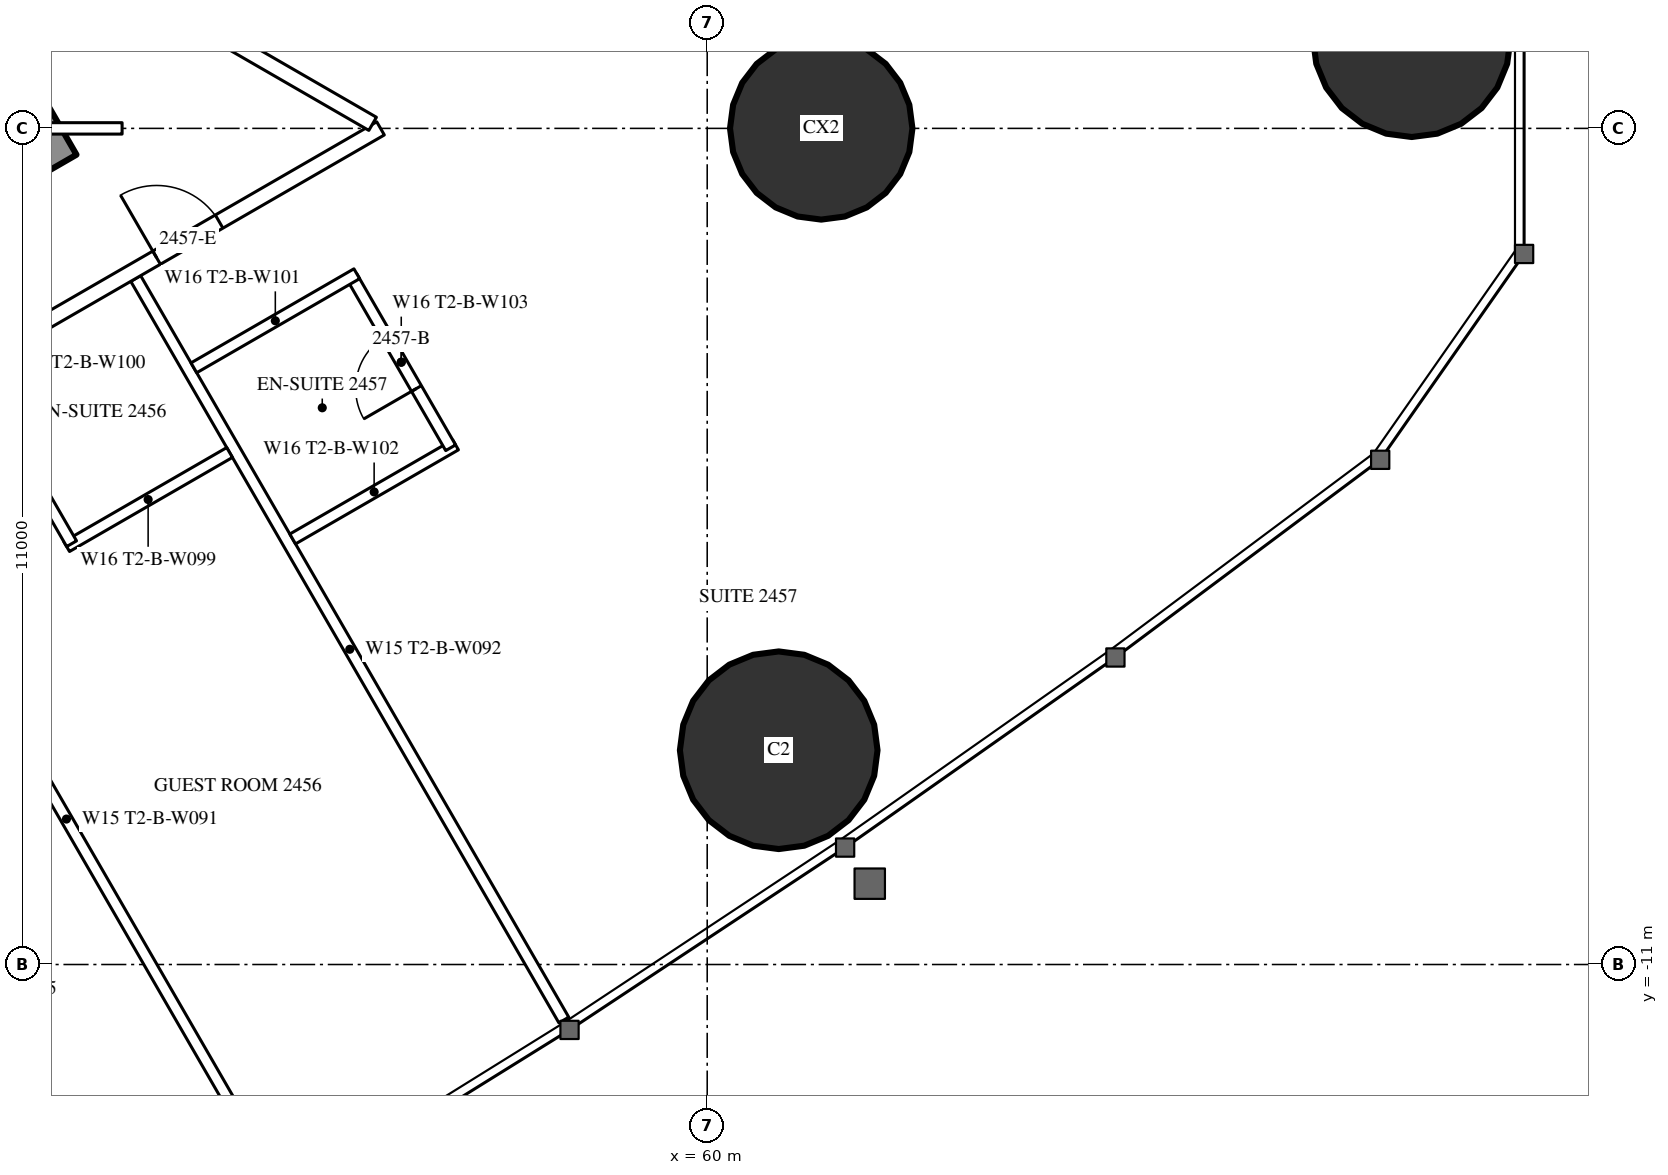
"""IFC4 building model, lengths in metres.
Left out: names, types, materials, properties, quantities, classifications, styles, units other than length and angle.
Written with IfcOpenShell. Run it as: python <this file> out.ifc"""

import sys

from ifc_helpers import new_model, si_unit, direction, frame, frame_2d, origin, origin_2d, place, context, subcontext, project, spatial, rectangle, circle, hollow_circle, extrude, element, fill, save


model = new_model("IFC4")
c1 = context("Model", 3, precision=1e-05, world=origin(), true_north=direction((0.0, 1.0)))
c2 = subcontext(c1, "Body", "Model", "MODEL_VIEW")
j1 = project(units=[si_unit("LENGTHUNIT", "METRE"), si_unit("PLANEANGLEUNIT", "RADIAN")], contexts=[c1])
p1 = place(None, origin())
s1 = spatial("IfcSite", under=j1, at=p1, CompositionType="ELEMENT")
p2 = place(p1, origin())
s2 = spatial("IfcBuilding", under=s1, at=p2, CompositionType="ELEMENT")
p3 = place(p2, frame((0.0, 0.0, 94.1)))
s3 = spatial("IfcBuildingStorey", under=s2, at=p3, CompositionType="ELEMENT", Elevation=94.1)
for number, where, z_axis, x_axis in (
    (1, (69.269, 1.187, 0.0), (0.0, 0.0, 1.0), (1.0, 0.0, 0.0)),
    (2, (60.941, -8.181, 0.0), (0.0, 0.0, 1.0), (1.0, 0.0, 0.0)),
):
    element("IfcColumn", number, at=place(p3, frame(where, z_axis=z_axis, x_axis=x_axis)), inside=s3, PredefinedType="COLUMN", context=c2, shape_type="SweptSolid", body=[
        extrude(hollow_circle(Radius=1.3, WallThickness=0.1, at=origin_2d()), origin(), (0.0, 0.0, 1.0), 3.5),
    ])
p4 = place(p3, frame((61.5, 0.0, 0.0), z_axis=(0.0, 0.0, 1.0), x_axis=(1.0, 0.0, 0.0)))
e3 = element("IfcColumn", 3, at=p4, inside=s3, PredefinedType="COLUMN", context=c2, shape_type="SweptSolid", body=[
    extrude(circle(Radius=1.2, at=origin_2d()), origin(), (0.0, 0.0, 1.0), 3.5),
])
p5 = place(p3, frame((27.2, -13.8, 0.0), z_axis=(0.0, 0.0, 1.0), x_axis=(0.866027159892, 0.499996958321, 0.0)))
e4 = element("IfcWall", 4, at=p5, inside=s3, PredefinedType="SHEAR", context=c2, shape_type="SweptSolid", body=[
    extrude(rectangle(XDim=27.947, YDim=1.2, at=frame_2d((13.973, 0.0))), origin(), (0.0, 0.0, 1.0), 3.5),
])
p6 = place(p5, frame((4.6, 0.0, 0.0)))
e5 = element("IfcOpeningElement", 5, at=p6, cuts=e4, PredefinedType="OPENING", context=c2, shape_type="SweptSolid", body=[
    extrude(rectangle(XDim=1.0, YDim=2.2, at=frame_2d((0.5, 1.1))), frame((0.0, 0.61, 0.0), z_axis=(0.0, -1.0, 0.0), x_axis=(1.0, 0.0, 0.0)), (0.0, 0.0, 1.0), 1.22),
])
p7 = place(p5, frame((13.395, 0.0, 0.0)))
e6 = element("IfcOpeningElement", 6, at=p7, cuts=e4, PredefinedType="OPENING", context=c2, shape_type="SweptSolid", body=[
    extrude(rectangle(XDim=1.8, YDim=2.2, at=frame_2d((0.9, 1.1))), frame((0.0, 0.61, 0.0), z_axis=(0.0, -1.0, 0.0), x_axis=(1.0, 0.0, 0.0)), (0.0, 0.0, 1.0), 1.22),
])
p8 = place(p3, frame((48.719, -4.147, 0.0), z_axis=(0.0, 0.0, 1.0), x_axis=(0.499990498062, -0.866030889661, 0.0)))
e7 = element("IfcWall", 7, at=p8, inside=s3, PredefinedType="PARTITIONING", context=c2, shape_type="SweptSolid", body=[
    extrude(rectangle(XDim=11.406, YDim=0.15, at=frame_2d((5.703, 0.0))), origin(), (0.0, 0.0, 1.0), 3.25),
])
p9 = place(p3, frame((52.481, -1.975, 0.0), z_axis=(0.0, 0.0, 1.0), x_axis=(0.500003867771, -0.866023170714, 0.0)))
e8 = element("IfcWall", 8, at=p9, inside=s3, PredefinedType="PARTITIONING", context=c2, shape_type="SweptSolid", body=[
    extrude(rectangle(XDim=11.265, YDim=0.15, at=frame_2d((5.632, 0.0))), origin(), (0.0, 0.0, 1.0), 3.25),
])
p10 = place(p3, frame((37.96, -10.243, 0.0), z_axis=(0.0, 0.0, 1.0), x_axis=(0.866026429433, 0.499998223521, 0.0)))
e9 = element("IfcWall", 9, at=p10, inside=s3, PredefinedType="PARTITIONING", context=c2, shape_type="SweptSolid", body=[
    extrude(rectangle(XDim=20.487, YDim=0.2, at=frame_2d((10.243, 0.0))), origin(), (0.0, 0.0, 1.0), 3.25),
])
p11 = place(p10, frame((4.047, 0.0, 0.0)))
e10 = element("IfcOpeningElement", 10, at=p11, cuts=e9, PredefinedType="OPENING", context=c2, shape_type="SweptSolid", body=[
    extrude(rectangle(XDim=0.95, YDim=2.2, at=frame_2d((0.475, 1.1))), frame((0.0, 0.11, 0.0), z_axis=(0.0, -1.0, 0.0), x_axis=(1.0, 0.0, 0.0)), (0.0, 0.0, 1.0), 0.22),
])
p12 = place(p10, frame((11.04, 0.0, 0.0)))
e11 = element("IfcOpeningElement", 11, at=p12, cuts=e9, PredefinedType="OPENING", context=c2, shape_type="SweptSolid", body=[
    extrude(rectangle(XDim=0.95, YDim=2.2, at=frame_2d((0.475, 1.1))), frame((0.0, 0.11, 0.0), z_axis=(0.0, -1.0, 0.0), x_axis=(1.0, 0.0, 0.0)), (0.0, 0.0, 1.0), 0.22),
])
p13 = place(p10, frame((13.035, 0.0, 0.0)))
e12 = element("IfcOpeningElement", 12, at=p13, cuts=e9, PredefinedType="OPENING", context=c2, shape_type="SweptSolid", body=[
    extrude(rectangle(XDim=0.95, YDim=2.2, at=frame_2d((0.475, 1.1))), frame((0.0, 0.11, 0.0), z_axis=(0.0, -1.0, 0.0), x_axis=(1.0, 0.0, 0.0)), (0.0, 0.0, 1.0), 0.22),
])
p14 = place(p10, frame((17.085, 0.0, 0.0)))
e13 = element("IfcOpeningElement", 13, at=p14, cuts=e9, PredefinedType="OPENING", context=c2, shape_type="SweptSolid", body=[
    extrude(rectangle(XDim=0.95, YDim=2.2, at=frame_2d((0.475, 1.1))), frame((0.0, 0.11, 0.0), z_axis=(0.0, -1.0, 0.0), x_axis=(1.0, 0.0, 0.0)), (0.0, 0.0, 1.0), 0.22),
])
p15 = place(p10, frame((1.048, 0.0, 0.0)))
e14 = element("IfcOpeningElement", 14, at=p15, cuts=e9, PredefinedType="OPENING", context=c2, shape_type="SweptSolid", body=[
    extrude(rectangle(XDim=1.8, YDim=2.2, at=frame_2d((0.9, 1.1))), frame((0.0, 0.11, 0.0), z_axis=(0.0, -1.0, 0.0), x_axis=(1.0, 0.0, 0.0)), (0.0, 0.0, 1.0), 0.22),
])
p16 = place(p3, frame((36.834, 10.894, 0.0), z_axis=(0.0, 0.0, 1.0), x_axis=(0.866028157229, -0.499995230863, 0.0)))
e15 = element("IfcWall", 15, at=p16, inside=s3, PredefinedType="PARTITIONING", context=c2, shape_type="SweptSolid", body=[
    extrude(rectangle(XDim=21.667, YDim=0.2, at=frame_2d((10.833, 0.0))), origin(), (0.0, 0.0, 1.0), 3.25),
])
p17 = place(p16, frame((14.04, 0.0, 0.0)))
e16 = element("IfcOpeningElement", 16, at=p17, cuts=e15, PredefinedType="OPENING", context=c2, shape_type="SweptSolid", body=[
    extrude(rectangle(XDim=0.95, YDim=2.2, at=frame_2d((0.475, 1.1))), frame((0.0, 0.11, 0.0), z_axis=(0.0, -1.0, 0.0), x_axis=(1.0, 0.0, 0.0)), (0.0, 0.0, 1.0), 0.22),
])
p18 = place(p16, frame((9.99, 0.0, 0.0)))
e17 = element("IfcOpeningElement", 17, at=p18, cuts=e15, PredefinedType="OPENING", context=c2, shape_type="SweptSolid", body=[
    extrude(rectangle(XDim=0.95, YDim=2.2, at=frame_2d((0.475, 1.1))), frame((0.0, 0.11, 0.0), z_axis=(0.0, -1.0, 0.0), x_axis=(1.0, 0.0, 0.0)), (0.0, 0.0, 1.0), 0.22),
])
p19 = place(p16, frame((3.35, 0.0, 0.0)))
e18 = element("IfcOpeningElement", 18, at=p19, cuts=e15, PredefinedType="OPENING", context=c2, shape_type="SweptSolid", body=[
    extrude(rectangle(XDim=1.0, YDim=2.2, at=frame_2d((0.5, 1.1))), frame((0.0, 0.11, 0.0), z_axis=(0.0, -1.0, 0.0), x_axis=(1.0, 0.0, 0.0)), (0.0, 0.0, 1.0), 0.22),
])
p20 = place(p3, frame((51.573, -5.502, 0.0), z_axis=(0.0, 0.0, 1.0), x_axis=(0.866006523861, 0.500032699561, 0.0)))
e19 = element("IfcWall", 19, at=p20, inside=s3, PredefinedType="PARTITIONING", context=c2, shape_type="SweptSolid", body=[
    extrude(rectangle(XDim=2.475, YDim=0.15, at=frame_2d((1.237, 0.0))), origin(), (0.0, 0.0, 1.0), 3.25),
])
p21 = place(p3, frame((50.338, -3.213, 0.0), z_axis=(0.0, 0.0, 1.0), x_axis=(0.500047596559, -0.865997922154, 0.0)))
e20 = element("IfcWall", 20, at=p21, inside=s3, PredefinedType="PARTITIONING", context=c2, shape_type="SweptSolid", body=[
    extrude(rectangle(XDim=2.6, YDim=0.15, at=frame_2d((1.3, 0.0))), origin(), (0.0, 0.0, 1.0), 3.25),
])
p22 = place(p21, frame((0.9, 0.0, 0.0)))
e21 = element("IfcOpeningElement", 21, at=p22, cuts=e20, PredefinedType="OPENING", context=c2, shape_type="SweptSolid", body=[
    extrude(rectangle(XDim=0.8, YDim=2.2, at=frame_2d((0.4, 1.1))), frame((0.0, 0.085, 0.0), z_axis=(0.0, -1.0, 0.0), x_axis=(1.0, 0.0, 0.0)), (0.0, 0.0, 1.0), 0.17),
])
p23 = place(p3, frame((54.546, -5.402, 0.0), z_axis=(0.0, 0.0, 1.0), x_axis=(0.866006523861, 0.500032699561, 0.0)))
e22 = element("IfcWall", 22, at=p23, inside=s3, PredefinedType="PARTITIONING", context=c2, shape_type="SweptSolid", body=[
    extrude(rectangle(XDim=2.475, YDim=0.15, at=frame_2d((1.237, 0.0))), origin(), (0.0, 0.0, 1.0), 3.25),
])
p24 = place(p3, frame((55.325, -1.95, 0.0), z_axis=(0.0, 0.0, 1.0), x_axis=(0.500006934395, -0.866021400173, 0.0)))
e23 = element("IfcWall", 23, at=p24, inside=s3, PredefinedType="PARTITIONING", context=c2, shape_type="SweptSolid", body=[
    extrude(rectangle(XDim=2.6, YDim=0.15, at=frame_2d((1.3, 0.0))), origin(), (0.0, 0.0, 1.0), 3.25),
])
p25 = place(p24, frame((0.9, 0.0, 0.0)))
e24 = element("IfcOpeningElement", 24, at=p25, cuts=e23, PredefinedType="OPENING", context=c2, shape_type="SweptSolid", body=[
    extrude(rectangle(XDim=0.8, YDim=2.2, at=frame_2d((0.4, 1.1))), frame((0.0, 0.085, 0.0), z_axis=(0.0, -1.0, 0.0), x_axis=(1.0, 0.0, 0.0)), (0.0, 0.0, 1.0), 0.17),
])
p26 = place(p3, frame((53.246, -3.15, 0.0), z_axis=(0.0, 0.0, 1.0), x_axis=(0.866006523861, 0.500032699561, 0.0)))
e25 = element("IfcWall", 25, at=p26, inside=s3, PredefinedType="PARTITIONING", context=c2, shape_type="SweptSolid", body=[
    extrude(rectangle(XDim=2.475, YDim=0.15, at=frame_2d((1.237, 0.0))), origin(), (0.0, 0.0, 1.0), 3.25),
])
p27 = place(p3, frame((44.575, 0.0, 0.0), z_axis=(0.0, 0.0, 1.0), x_axis=(1.0, 0.0, 0.0)))
e26 = element("IfcWall", 26, at=p27, inside=s3, PredefinedType="PARTITIONING", context=c2, shape_type="SweptSolid", body=[
    extrude(rectangle(XDim=7.727, YDim=0.15, at=frame_2d((3.864, 0.0))), origin(), (0.0, 0.0, 1.0), 2.2),
])
p28 = place(p25, origin())
e27 = element("IfcDoor", 27, at=p28, inside=s3, OperationType="SINGLE_SWING_RIGHT", PredefinedType="DOOR", context=c2, shape_type="SweptSolid", body=[
    extrude(rectangle(XDim=0.8, YDim=2.2, at=frame_2d((0.4, 1.1))), frame((0.0, 0.025, 0.0), z_axis=(0.0, -1.0, 0.0), x_axis=(1.0, 0.0, 0.0)), (0.0, 0.0, 1.0), 0.05),
])
fill(e24, e27)
p29 = place(p14, origin())
e28 = element("IfcDoor", 28, at=p29, inside=s3, OperationType="SINGLE_SWING_LEFT", PredefinedType="DOOR", context=c2, shape_type="SweptSolid", body=[
    extrude(rectangle(XDim=0.95, YDim=2.2, at=frame_2d((0.475, 1.1))), frame((0.0, 0.025, 0.0), z_axis=(0.0, -1.0, 0.0), x_axis=(1.0, 0.0, 0.0)), (0.0, 0.0, 1.0), 0.05),
])
fill(e13, e28)
save(model, sys.argv[1])
